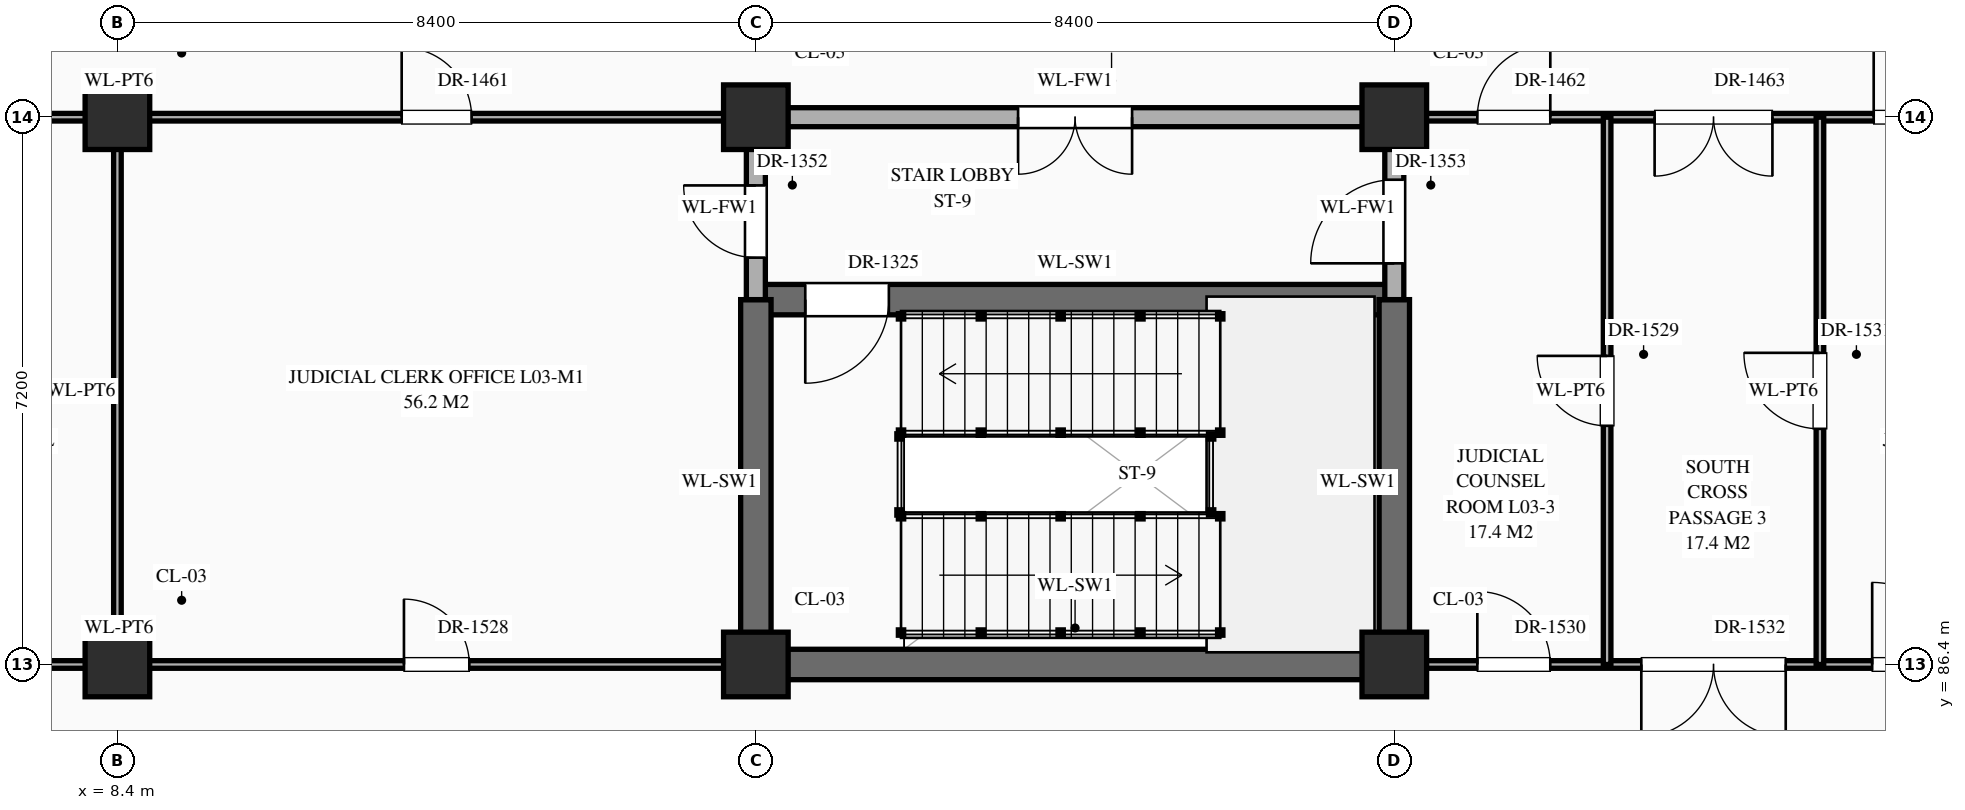
"""IFC4 building model, lengths in metres.
Left out: names, types, materials, properties, quantities, classifications, styles, units other than length and angle.
Written with IfcOpenShell. Run it as: python <this file> out.ifc"""

import sys

from ifc_helpers import new_model, si_unit, direction, frame, frame_2d, origin, origin_2d, place, context, subcontext, project, spatial, rectangle, extrude, element, fill, save


model = new_model("IFC4")
c1 = context("Model", 3, precision=1e-05, world=origin(), true_north=direction((0.0, 1.0)))
c2 = subcontext(c1, "Body", "Model", "MODEL_VIEW")
j1 = project(units=[si_unit("LENGTHUNIT", "METRE"), si_unit("PLANEANGLEUNIT", "RADIAN")], contexts=[c1])
p1 = place(None, origin())
s1 = spatial("IfcSite", under=j1, at=p1, CompositionType="ELEMENT")
p2 = place(p1, origin())
s2 = spatial("IfcBuilding", under=s1, at=p2, CompositionType="ELEMENT")
p3 = place(p2, frame((0.0, 0.0, 10.8)))
s3 = spatial("IfcBuildingStorey", under=s2, at=p3, CompositionType="ELEMENT", Elevation=10.8)
for number, where, z_axis, x_axis in (
    (1, (8.4, 86.4, 0.0), (0.0, 0.0, 1.0), (1.0, 0.0, 0.0)),
    (2, (8.4, 93.6, 0.0), (0.0, 0.0, 1.0), (1.0, 0.0, 0.0)),
    (3, (16.8, 86.4, 0.0), (0.0, 0.0, 1.0), (1.0, 0.0, 0.0)),
    (4, (16.8, 93.6, 0.0), (0.0, 0.0, 1.0), (1.0, 0.0, 0.0)),
    (5, (25.2, 86.4, 0.0), (0.0, 0.0, 1.0), (1.0, 0.0, 0.0)),
    (6, (25.2, 93.6, 0.0), (0.0, 0.0, 1.0), (1.0, 0.0, 0.0)),
):
    element("IfcColumn", number, at=place(p3, frame(where, z_axis=z_axis, x_axis=x_axis)), inside=s3, PredefinedType="COLUMN", context=c2, shape_type="SweptSolid", body=[
        extrude(rectangle(XDim=0.85, YDim=0.85, at=origin_2d()), origin(), (0.0, 0.0, 1.0), 5.4),
    ])
p4 = place(p3, frame((0.04, 86.4, 0.0), z_axis=(0.0, 0.0, 1.0), x_axis=(1.0, 0.0, 0.0)))
e7 = element("IfcWall", 7, at=p4, inside=s3, PredefinedType="STANDARD", context=c2, shape_type="SweptSolid", body=[
    extrude(rectangle(XDim=16.76, YDim=0.1, at=frame_2d((8.38, 0.0))), origin(), (0.0, 0.0, 1.0), 4.27),
])
p5 = place(p4, frame((1.022, 0.0, 0.0)))
e8 = element("IfcOpeningElement", 8, at=p5, cuts=e7, PredefinedType="OPENING", context=c2, shape_type="SweptSolid", body=[
    extrude(rectangle(XDim=1.02, YDim=2.4, at=frame_2d((0.51, 1.2))), frame((0.0, 0.062, 0.0), z_axis=(0.0, -1.0, 0.0), x_axis=(1.0, 0.0, 0.0)), (0.0, 0.0, 1.0), 0.124),
])
p6 = place(p4, frame((3.21, 0.0, 0.0)))
e9 = element("IfcOpeningElement", 9, at=p6, cuts=e7, PredefinedType="OPENING", context=c2, shape_type="SweptSolid", body=[
    extrude(rectangle(XDim=1.9, YDim=2.5, at=frame_2d((0.95, 1.25))), frame((0.0, 0.062, 0.0), z_axis=(0.0, -1.0, 0.0), x_axis=(1.0, 0.0, 0.0)), (0.0, 0.0, 1.0), 0.124),
])
p7 = place(p4, frame((6.337, 0.0, 0.0)))
e10 = element("IfcOpeningElement", 10, at=p7, cuts=e7, PredefinedType="OPENING", context=c2, shape_type="SweptSolid", body=[
    extrude(rectangle(XDim=0.9, YDim=2.15, at=frame_2d((0.45, 1.075))), frame((0.0, 0.062, 0.0), z_axis=(0.0, -1.0, 0.0), x_axis=(1.0, 0.0, 0.0)), (0.0, 0.0, 1.0), 0.124),
])
p8 = place(p4, frame((12.13, 0.0, 0.0)))
e11 = element("IfcOpeningElement", 11, at=p8, cuts=e7, PredefinedType="OPENING", context=c2, shape_type="SweptSolid", body=[
    extrude(rectangle(XDim=0.86, YDim=2.1, at=frame_2d((0.43, 1.05))), frame((0.0, 0.062, 0.0), z_axis=(0.0, -1.0, 0.0), x_axis=(1.0, 0.0, 0.0)), (0.0, 0.0, 1.0), 0.124),
])
p9 = place(p3, frame((16.8, 86.4, 0.0), z_axis=(0.0, 0.0, 1.0), x_axis=(1.0, 0.0, 0.0)))
e12 = element("IfcWall", 12, at=p9, inside=s3, PredefinedType="SHEAR", context=c2, shape_type="SweptSolid", body=[
    extrude(rectangle(XDim=8.4, YDim=0.4, at=frame_2d((4.2, 0.0))), origin(), (0.0, 0.0, 1.0), 5.12),
])
p10 = place(p3, frame((25.2, 86.4, 0.0), z_axis=(0.0, 0.0, 1.0), x_axis=(1.0, 0.0, 0.0)))
e13 = element("IfcWall", 13, at=p10, inside=s3, PredefinedType="STANDARD", context=c2, shape_type="SweptSolid", body=[
    extrude(rectangle(XDim=16.8, YDim=0.1, at=frame_2d((8.4, 0.0))), origin(), (0.0, 0.0, 1.0), 4.27),
])
p11 = place(p10, frame((1.093, 0.0, 0.0)))
e14 = element("IfcOpeningElement", 14, at=p11, cuts=e13, PredefinedType="OPENING", context=c2, shape_type="SweptSolid", body=[
    extrude(rectangle(XDim=0.96, YDim=2.2, at=frame_2d((0.48, 1.1))), frame((0.0, 0.062, 0.0), z_axis=(0.0, -1.0, 0.0), x_axis=(1.0, 0.0, 0.0)), (0.0, 0.0, 1.0), 0.124),
])
p12 = place(p10, frame((3.25, 0.0, 0.0)))
e15 = element("IfcOpeningElement", 15, at=p12, cuts=e13, PredefinedType="OPENING", context=c2, shape_type="SweptSolid", body=[
    extrude(rectangle(XDim=1.9, YDim=2.5, at=frame_2d((0.95, 1.25))), frame((0.0, 0.062, 0.0), z_axis=(0.0, -1.0, 0.0), x_axis=(1.0, 0.0, 0.0)), (0.0, 0.0, 1.0), 0.124),
])
p13 = place(p10, frame((6.288, 0.0, 0.0)))
e16 = element("IfcOpeningElement", 16, at=p13, cuts=e13, PredefinedType="OPENING", context=c2, shape_type="SweptSolid", body=[
    extrude(rectangle(XDim=1.08, YDim=2.25, at=frame_2d((0.54, 1.125))), frame((0.0, 0.062, 0.0), z_axis=(0.0, -1.0, 0.0), x_axis=(1.0, 0.0, 0.0)), (0.0, 0.0, 1.0), 0.124),
])
p14 = place(p10, frame((12.04, 0.0, 0.0)))
e17 = element("IfcOpeningElement", 17, at=p14, cuts=e13, PredefinedType="OPENING", context=c2, shape_type="SweptSolid", body=[
    extrude(rectangle(XDim=1.12, YDim=2.25, at=frame_2d((0.56, 1.125))), frame((0.0, 0.062, 0.0), z_axis=(0.0, -1.0, 0.0), x_axis=(1.0, 0.0, 0.0)), (0.0, 0.0, 1.0), 0.124),
])
p15 = place(p3, frame((16.8, 91.2, 0.0), z_axis=(0.0, 0.0, 1.0), x_axis=(1.0, 0.0, 0.0)))
e18 = element("IfcWall", 18, at=p15, inside=s3, PredefinedType="SHEAR", context=c2, shape_type="SweptSolid", body=[
    extrude(rectangle(XDim=8.4, YDim=0.4, at=frame_2d((4.2, 0.0))), origin(), (0.0, 0.0, 1.0), 5.12),
])
p16 = place(p15, frame((0.65, 0.0, 0.0)))
e19 = element("IfcOpeningElement", 19, at=p16, cuts=e18, PredefinedType="OPENING", context=c2, shape_type="SweptSolid", body=[
    extrude(rectangle(XDim=1.1, YDim=2.2, at=frame_2d((0.55, 1.1))), frame((0.0, 0.212, 0.0), z_axis=(0.0, -1.0, 0.0), x_axis=(1.0, 0.0, 0.0)), (0.0, 0.0, 1.0), 0.424),
])
p17 = place(p3, frame((0.04, 93.6, 0.0), z_axis=(0.0, 0.0, 1.0), x_axis=(1.0, 0.0, 0.0)))
e20 = element("IfcWall", 20, at=p17, inside=s3, PredefinedType="STANDARD", context=c2, shape_type="SweptSolid", body=[
    extrude(rectangle(XDim=16.76, YDim=0.1, at=frame_2d((8.38, 0.0))), origin(), (0.0, 0.0, 1.0), 4.27),
])
p18 = place(p17, frame((0.962, 0.0, 0.0)))
e21 = element("IfcOpeningElement", 21, at=p18, cuts=e20, PredefinedType="OPENING", context=c2, shape_type="SweptSolid", body=[
    extrude(rectangle(XDim=1.14, YDim=2.4, at=frame_2d((0.57, 1.2))), frame((0.0, 0.062, 0.0), z_axis=(0.0, -1.0, 0.0), x_axis=(1.0, 0.0, 0.0)), (0.0, 0.0, 1.0), 0.124),
])
p19 = place(p17, frame((3.435, 0.0, 0.0)))
e22 = element("IfcOpeningElement", 22, at=p19, cuts=e20, PredefinedType="OPENING", context=c2, shape_type="SweptSolid", body=[
    extrude(rectangle(XDim=1.45, YDim=2.3, at=frame_2d((0.725, 1.15))), frame((0.0, 0.062, 0.0), z_axis=(0.0, -1.0, 0.0), x_axis=(1.0, 0.0, 0.0)), (0.0, 0.0, 1.0), 0.124),
])
p20 = place(p17, frame((6.357, 0.0, 0.0)))
e23 = element("IfcOpeningElement", 23, at=p20, cuts=e20, PredefinedType="OPENING", context=c2, shape_type="SweptSolid", body=[
    extrude(rectangle(XDim=0.86, YDim=2.1, at=frame_2d((0.43, 1.05))), frame((0.0, 0.062, 0.0), z_axis=(0.0, -1.0, 0.0), x_axis=(1.0, 0.0, 0.0)), (0.0, 0.0, 1.0), 0.124),
])
p21 = place(p17, frame((12.1, 0.0, 0.0)))
e24 = element("IfcOpeningElement", 24, at=p21, cuts=e20, PredefinedType="OPENING", context=c2, shape_type="SweptSolid", body=[
    extrude(rectangle(XDim=0.92, YDim=2.15, at=frame_2d((0.46, 1.075))), frame((0.0, 0.062, 0.0), z_axis=(0.0, -1.0, 0.0), x_axis=(1.0, 0.0, 0.0)), (0.0, 0.0, 1.0), 0.124),
])
p22 = place(p3, frame((16.8, 93.6, 0.0), z_axis=(0.0, 0.0, 1.0), x_axis=(1.0, 0.0, 0.0)))
e25 = element("IfcWall", 25, at=p22, inside=s3, PredefinedType="STANDARD", context=c2, shape_type="SweptSolid", body=[
    extrude(rectangle(XDim=8.4, YDim=0.25, at=frame_2d((4.2, 0.0))), origin(), (0.0, 0.0, 1.0), 4.27),
])
p23 = place(p22, frame((3.45, 0.0, 0.0)))
e26 = element("IfcOpeningElement", 26, at=p23, cuts=e25, PredefinedType="OPENING", context=c2, shape_type="SweptSolid", body=[
    extrude(rectangle(XDim=1.5, YDim=2.25, at=frame_2d((0.75, 1.125))), frame((0.0, 0.137, 0.0), z_axis=(0.0, -1.0, 0.0), x_axis=(1.0, 0.0, 0.0)), (0.0, 0.0, 1.0), 0.274),
])
p24 = place(p3, frame((25.2, 93.6, 0.0), z_axis=(0.0, 0.0, 1.0), x_axis=(1.0, 0.0, 0.0)))
e27 = element("IfcWall", 27, at=p24, inside=s3, PredefinedType="STANDARD", context=c2, shape_type="SweptSolid", body=[
    extrude(rectangle(XDim=16.8, YDim=0.1, at=frame_2d((8.4, 0.0))), origin(), (0.0, 0.0, 1.0), 4.27),
])
p25 = place(p24, frame((1.093, 0.0, 0.0)))
e28 = element("IfcOpeningElement", 28, at=p25, cuts=e27, PredefinedType="OPENING", context=c2, shape_type="SweptSolid", body=[
    extrude(rectangle(XDim=0.96, YDim=2.2, at=frame_2d((0.48, 1.1))), frame((0.0, 0.062, 0.0), z_axis=(0.0, -1.0, 0.0), x_axis=(1.0, 0.0, 0.0)), (0.0, 0.0, 1.0), 0.124),
])
p26 = place(p24, frame((3.425, 0.0, 0.0)))
e29 = element("IfcOpeningElement", 29, at=p26, cuts=e27, PredefinedType="OPENING", context=c2, shape_type="SweptSolid", body=[
    extrude(rectangle(XDim=1.55, YDim=2.35, at=frame_2d((0.775, 1.175))), frame((0.0, 0.062, 0.0), z_axis=(0.0, -1.0, 0.0), x_axis=(1.0, 0.0, 0.0)), (0.0, 0.0, 1.0), 0.124),
])
p27 = place(p24, frame((6.308, 0.0, 0.0)))
e30 = element("IfcOpeningElement", 30, at=p27, cuts=e27, PredefinedType="OPENING", context=c2, shape_type="SweptSolid", body=[
    extrude(rectangle(XDim=1.04, YDim=2.2, at=frame_2d((0.52, 1.1))), frame((0.0, 0.062, 0.0), z_axis=(0.0, -1.0, 0.0), x_axis=(1.0, 0.0, 0.0)), (0.0, 0.0, 1.0), 0.124),
])
p28 = place(p24, frame((12.06, 0.0, 0.0)))
e31 = element("IfcOpeningElement", 31, at=p28, cuts=e27, PredefinedType="OPENING", context=c2, shape_type="SweptSolid", body=[
    extrude(rectangle(XDim=1.08, YDim=2.25, at=frame_2d((0.54, 1.125))), frame((0.0, 0.062, 0.0), z_axis=(0.0, -1.0, 0.0), x_axis=(1.0, 0.0, 0.0)), (0.0, 0.0, 1.0), 0.124),
])
p29 = place(p3, frame((8.4, 86.4, 0.0), z_axis=(0.0, 0.0, 1.0), x_axis=(0.0, 1.0, 0.0)))
e32 = element("IfcWall", 32, at=p29, inside=s3, PredefinedType="STANDARD", context=c2, shape_type="SweptSolid", body=[
    extrude(rectangle(XDim=7.2, YDim=0.1, at=frame_2d((3.6, 0.0))), origin(), (0.0, 0.0, 1.0), 4.37),
])
p30 = place(p3, frame((16.8, 86.4, 0.0), z_axis=(0.0, 0.0, 1.0), x_axis=(0.0, 1.0, 0.0)))
e33 = element("IfcWall", 33, at=p30, inside=s3, PredefinedType="SHEAR", context=c2, shape_type="SweptSolid", body=[
    extrude(rectangle(XDim=4.8, YDim=0.4, at=frame_2d((2.4, 0.0))), origin(), (0.0, 0.0, 1.0), 5.12),
])
p31 = place(p3, frame((16.8, 91.2, 0.0), z_axis=(0.0, 0.0, 1.0), x_axis=(0.0, 1.0, 0.0)))
e34 = element("IfcWall", 34, at=p31, inside=s3, PredefinedType="STANDARD", context=c2, shape_type="SweptSolid", body=[
    extrude(rectangle(XDim=2.4, YDim=0.25, at=frame_2d((1.2, 0.0))), origin(), (0.0, 0.0, 1.0), 4.37),
])
p32 = place(p31, frame((0.552, 0.0, 0.0)))
e35 = element("IfcOpeningElement", 35, at=p32, cuts=e34, PredefinedType="OPENING", context=c2, shape_type="SweptSolid", body=[
    extrude(rectangle(XDim=0.95, YDim=2.15, at=frame_2d((0.475, 1.075))), frame((0.0, 0.137, 0.0), z_axis=(0.0, -1.0, 0.0), x_axis=(1.0, 0.0, 0.0)), (0.0, 0.0, 1.0), 0.274),
])
p33 = place(p3, frame((25.2, 86.4, 0.0), z_axis=(0.0, 0.0, 1.0), x_axis=(0.0, 1.0, 0.0)))
e36 = element("IfcWall", 36, at=p33, inside=s3, PredefinedType="SHEAR", context=c2, shape_type="SweptSolid", body=[
    extrude(rectangle(XDim=4.8, YDim=0.4, at=frame_2d((2.4, 0.0))), origin(), (0.0, 0.0, 1.0), 5.12),
])
p34 = place(p3, frame((25.2, 91.2, 0.0), z_axis=(0.0, 0.0, 1.0), x_axis=(0.0, 1.0, 0.0)))
e37 = element("IfcWall", 37, at=p34, inside=s3, PredefinedType="STANDARD", context=c2, shape_type="SweptSolid", body=[
    extrude(rectangle(XDim=2.4, YDim=0.25, at=frame_2d((1.2, 0.0))), origin(), (0.0, 0.0, 1.0), 4.37),
])
p35 = place(p34, frame((0.478, 0.0, 0.0)))
e38 = element("IfcOpeningElement", 38, at=p35, cuts=e37, PredefinedType="OPENING", context=c2, shape_type="SweptSolid", body=[
    extrude(rectangle(XDim=1.1, YDim=2.2, at=frame_2d((0.55, 1.1))), frame((0.0, 0.137, 0.0), z_axis=(0.0, -1.0, 0.0), x_axis=(1.0, 0.0, 0.0)), (0.0, 0.0, 1.0), 0.274),
])
p36 = place(p3, frame((28.0, 86.4, 0.0), z_axis=(0.0, 0.0, 1.0), x_axis=(0.0, 1.0, 0.0)))
e39 = element("IfcWall", 39, at=p36, inside=s3, PredefinedType="STANDARD", context=c2, shape_type="SweptSolid", body=[
    extrude(rectangle(XDim=7.2, YDim=0.1, at=frame_2d((3.6, 0.0))), origin(), (0.0, 0.0, 1.0), 5.12),
])
p37 = place(p36, frame((3.14, 0.0, 0.0)))
e40 = element("IfcOpeningElement", 40, at=p37, cuts=e39, PredefinedType="OPENING", context=c2, shape_type="SweptSolid", body=[
    extrude(rectangle(XDim=0.92, YDim=2.15, at=frame_2d((0.46, 1.075))), frame((0.0, 0.062, 0.0), z_axis=(0.0, -1.0, 0.0), x_axis=(1.0, 0.0, 0.0)), (0.0, 0.0, 1.0), 0.124),
])
p38 = place(p3, frame((30.8, 86.4, 0.0), z_axis=(0.0, 0.0, 1.0), x_axis=(0.0, 1.0, 0.0)))
e41 = element("IfcWall", 41, at=p38, inside=s3, PredefinedType="STANDARD", context=c2, shape_type="SweptSolid", body=[
    extrude(rectangle(XDim=7.2, YDim=0.1, at=frame_2d((3.6, 0.0))), origin(), (0.0, 0.0, 1.0), 5.12),
])
p39 = place(p38, frame((3.1, 0.0, 0.0)))
e42 = element("IfcOpeningElement", 42, at=p39, cuts=e41, PredefinedType="OPENING", context=c2, shape_type="SweptSolid", body=[
    extrude(rectangle(XDim=1.0, YDim=2.25, at=frame_2d((0.5, 1.125))), frame((0.0, 0.062, 0.0), z_axis=(0.0, -1.0, 0.0), x_axis=(1.0, 0.0, 0.0)), (0.0, 0.0, 1.0), 0.124),
])
p40 = place(p16, frame((1.1, 0.0, 0.0), z_axis=(0.0, 0.0, 1.0), x_axis=(-1.0, 0.0, 0.0)))
e43 = element("IfcDoor", 43, at=p40, inside=s3, OperationType="SINGLE_SWING_RIGHT", PredefinedType="DOOR", context=c2, shape_type="SweptSolid", body=[
    extrude(rectangle(XDim=1.1, YDim=2.2, at=frame_2d((0.55, 1.1))), frame((0.0, 0.025, 0.0), z_axis=(0.0, -1.0, 0.0), x_axis=(1.0, 0.0, 0.0)), (0.0, 0.0, 1.0), 0.05),
])
fill(e19, e43)
p41 = place(p23, frame((1.5, 0.0, 0.0), z_axis=(0.0, 0.0, 1.0), x_axis=(-1.0, 0.0, 0.0)))
e44 = element("IfcDoor", 44, at=p41, inside=s3, OperationType="DOUBLE_DOOR_SINGLE_SWING", PredefinedType="DOOR", context=c2, shape_type="SweptSolid", body=[
    extrude(rectangle(XDim=1.5, YDim=2.25, at=frame_2d((0.75, 1.125))), frame((0.0, 0.025, 0.0), z_axis=(0.0, -1.0, 0.0), x_axis=(1.0, 0.0, 0.0)), (0.0, 0.0, 1.0), 0.05),
])
fill(e26, e44)
p42 = place(p32, origin())
e45 = element("IfcDoor", 45, at=p42, inside=s3, OperationType="SINGLE_SWING_RIGHT", PredefinedType="DOOR", context=c2, shape_type="SweptSolid", body=[
    extrude(rectangle(XDim=0.95, YDim=2.15, at=frame_2d((0.475, 1.075))), frame((0.0, 0.025, 0.0), z_axis=(0.0, -1.0, 0.0), x_axis=(1.0, 0.0, 0.0)), (0.0, 0.0, 1.0), 0.05),
])
fill(e35, e45)
p43 = place(p35, origin())
e46 = element("IfcDoor", 46, at=p43, inside=s3, OperationType="SINGLE_SWING_LEFT", PredefinedType="DOOR", context=c2, shape_type="SweptSolid", body=[
    extrude(rectangle(XDim=1.1, YDim=2.2, at=frame_2d((0.55, 1.1))), frame((0.0, 0.025, 0.0), z_axis=(0.0, -1.0, 0.0), x_axis=(1.0, 0.0, 0.0)), (0.0, 0.0, 1.0), 0.05),
])
fill(e38, e46)
p44 = place(p21, origin())
e47 = element("IfcDoor", 47, at=p44, inside=s3, OperationType="SINGLE_SWING_LEFT", PredefinedType="DOOR", context=c2, shape_type="SweptSolid", body=[
    extrude(rectangle(XDim=0.92, YDim=2.15, at=frame_2d((0.46, 1.075))), frame((0.0, 0.025, 0.0), z_axis=(0.0, -1.0, 0.0), x_axis=(1.0, 0.0, 0.0)), (0.0, 0.0, 1.0), 0.05),
])
fill(e24, e47)
p45 = place(p25, origin())
e48 = element("IfcDoor", 48, at=p45, inside=s3, OperationType="SINGLE_SWING_RIGHT", PredefinedType="DOOR", context=c2, shape_type="SweptSolid", body=[
    extrude(rectangle(XDim=0.96, YDim=2.2, at=frame_2d((0.48, 1.1))), frame((0.0, 0.025, 0.0), z_axis=(0.0, -1.0, 0.0), x_axis=(1.0, 0.0, 0.0)), (0.0, 0.0, 1.0), 0.05),
])
fill(e28, e48)
p46 = place(p26, frame((1.55, 0.0, 0.0), z_axis=(0.0, 0.0, 1.0), x_axis=(-1.0, 0.0, 0.0)))
e49 = element("IfcDoor", 49, at=p46, inside=s3, OperationType="DOUBLE_DOOR_SINGLE_SWING", PredefinedType="DOOR", context=c2, shape_type="SweptSolid", body=[
    extrude(rectangle(XDim=1.55, YDim=2.35, at=frame_2d((0.775, 1.175))), frame((0.0, 0.025, 0.0), z_axis=(0.0, -1.0, 0.0), x_axis=(1.0, 0.0, 0.0)), (0.0, 0.0, 1.0), 0.05),
])
fill(e29, e49)
p47 = place(p27, origin())
e50 = element("IfcDoor", 50, at=p47, inside=s3, OperationType="SINGLE_SWING_LEFT", PredefinedType="DOOR", context=c2, shape_type="SweptSolid", body=[
    extrude(rectangle(XDim=1.04, YDim=2.2, at=frame_2d((0.52, 1.1))), frame((0.0, 0.025, 0.0), z_axis=(0.0, -1.0, 0.0), x_axis=(1.0, 0.0, 0.0)), (0.0, 0.0, 1.0), 0.05),
])
fill(e30, e50)
p48 = place(p8, origin())
e51 = element("IfcDoor", 51, at=p48, inside=s3, OperationType="SINGLE_SWING_LEFT", PredefinedType="DOOR", context=c2, shape_type="SweptSolid", body=[
    extrude(rectangle(XDim=0.86, YDim=2.1, at=frame_2d((0.43, 1.05))), frame((0.0, 0.025, 0.0), z_axis=(0.0, -1.0, 0.0), x_axis=(1.0, 0.0, 0.0)), (0.0, 0.0, 1.0), 0.05),
])
fill(e11, e51)
p49 = place(p37, origin())
e52 = element("IfcDoor", 52, at=p49, inside=s3, OperationType="SINGLE_SWING_RIGHT", PredefinedType="DOOR", context=c2, shape_type="SweptSolid", body=[
    extrude(rectangle(XDim=0.92, YDim=2.15, at=frame_2d((0.46, 1.075))), frame((0.0, 0.025, 0.0), z_axis=(0.0, -1.0, 0.0), x_axis=(1.0, 0.0, 0.0)), (0.0, 0.0, 1.0), 0.05),
])
fill(e40, e52)
p50 = place(p11, origin())
e53 = element("IfcDoor", 53, at=p50, inside=s3, OperationType="SINGLE_SWING_LEFT", PredefinedType="DOOR", context=c2, shape_type="SweptSolid", body=[
    extrude(rectangle(XDim=0.96, YDim=2.2, at=frame_2d((0.48, 1.1))), frame((0.0, 0.025, 0.0), z_axis=(0.0, -1.0, 0.0), x_axis=(1.0, 0.0, 0.0)), (0.0, 0.0, 1.0), 0.05),
])
fill(e14, e53)
p51 = place(p39, origin())
e54 = element("IfcDoor", 54, at=p51, inside=s3, OperationType="SINGLE_SWING_RIGHT", PredefinedType="DOOR", context=c2, shape_type="SweptSolid", body=[
    extrude(rectangle(XDim=1.0, YDim=2.25, at=frame_2d((0.5, 1.125))), frame((0.0, 0.025, 0.0), z_axis=(0.0, -1.0, 0.0), x_axis=(1.0, 0.0, 0.0)), (0.0, 0.0, 1.0), 0.05),
])
fill(e42, e54)
p52 = place(p12, frame((1.9, 0.0, 0.0), z_axis=(0.0, 0.0, 1.0), x_axis=(-1.0, 0.0, 0.0)))
e55 = element("IfcDoor", 55, at=p52, inside=s3, OperationType="DOUBLE_DOOR_SINGLE_SWING", PredefinedType="DOOR", context=c2, shape_type="SweptSolid", body=[
    extrude(rectangle(XDim=1.9, YDim=2.5, at=frame_2d((0.95, 1.25))), frame((0.0, 0.025, 0.0), z_axis=(0.0, -1.0, 0.0), x_axis=(1.0, 0.0, 0.0)), (0.0, 0.0, 1.0), 0.05),
])
fill(e15, e55)
p53 = place(p13, origin())
e56 = element("IfcDoor", 56, at=p53, inside=s3, OperationType="SINGLE_SWING_LEFT", PredefinedType="DOOR", context=c2, shape_type="SweptSolid", body=[
    extrude(rectangle(XDim=1.08, YDim=2.25, at=frame_2d((0.54, 1.125))), frame((0.0, 0.025, 0.0), z_axis=(0.0, -1.0, 0.0), x_axis=(1.0, 0.0, 0.0)), (0.0, 0.0, 1.0), 0.05),
])
fill(e16, e56)
save(model, sys.argv[1])
